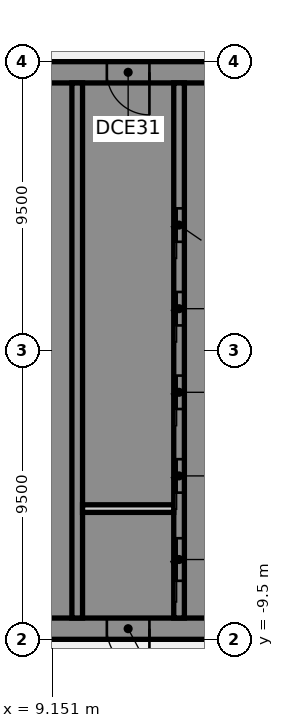
"""IFC4 building model, lengths in metres.
Left out: names, types, materials, properties, quantities, classifications, styles, units other than length and angle.
Written with IfcOpenShell. Run it as: python <this file> out.ifc"""

import sys

from ifc_helpers import new_model, si_unit, direction, frame, frame_2d, origin, place, context, subcontext, project, spatial, polyline, rectangle, outline, extrude, element, fill, save


model = new_model("IFC4")
c1 = context("Model", 3, precision=1e-05, world=origin(), true_north=direction((0.0, 1.0)))
c2 = subcontext(c1, "Body", "Model", "MODEL_VIEW")
j1 = project(units=[si_unit("LENGTHUNIT", "METRE"), si_unit("PLANEANGLEUNIT", "RADIAN")], contexts=[c1])
p1 = place(None, origin())
s1 = spatial("IfcSite", under=j1, at=p1, CompositionType="ELEMENT")
p2 = place(p1, origin())
s2 = spatial("IfcBuilding", under=s1, at=p2, CompositionType="ELEMENT")
p3 = place(p2, frame((0.0, 0.0, 79.0)))
s3 = spatial("IfcBuildingStorey", under=s2, at=p3, CompositionType="ELEMENT", Elevation=79.0)
p4 = place(p3, frame((16.5, -9.15, 0.0), z_axis=(0.0, 0.0, 1.0), x_axis=(-1.0, 0.0, 0.0)))
e1 = element("IfcWall", 1, at=p4, inside=s3, PredefinedType="SHEAR", context=c2, shape_type="SweptSolid", body=[
    extrude(rectangle(XDim=13.0, YDim=0.7, at=frame_2d((6.5, 0.0))), origin(), (0.0, 0.0, 1.0), 4.36),
])
p5 = place(p4, frame((4.15, 0.0, 0.0)))
e2 = element("IfcOpeningElement", 2, at=p5, cuts=e1, PredefinedType="OPENING", context=c2, shape_type="SweptSolid", body=[
    extrude(rectangle(XDim=1.4, YDim=2.1, at=frame_2d((0.7, 1.05))), frame((0.0, 0.36, 0.0), z_axis=(0.0, -1.0, 0.0), x_axis=(1.0, 0.0, 0.0)), (0.0, 0.0, 1.0), 0.72),
])
p6 = place(p4, frame((10.125, 0.0, 0.0)))
e3 = element("IfcOpeningElement", 3, at=p6, cuts=e1, PredefinedType="OPENING", context=c2, shape_type="SweptSolid", body=[
    extrude(rectangle(XDim=1.4, YDim=2.1, at=frame_2d((0.7, 1.05))), frame((0.0, 0.36, 0.0), z_axis=(0.0, -1.0, 0.0), x_axis=(1.0, 0.0, 0.0)), (0.0, 0.0, 1.0), 0.72),
])
p7 = place(p3, origin())
e4 = element("IfcWall", 4, at=p7, inside=s3, PredefinedType="SHEAR", context=c2, shape_type="SweptSolid", body=[
    extrude(outline(polyline([(13.5, -8.8), (15.8, -8.8), (16.5, -8.8), (16.5, 8.8), (15.8, 8.8), (13.5, 8.8), (13.5, 8.125), (15.8, 8.125), (15.8, 5.625), (13.5, 5.625), (13.5, 5.375), (15.8, 5.375), (15.8, 2.875), (13.5, 2.875), (13.5, 2.625), (15.8, 2.625), (15.8, 0.125), (13.5, 0.125), (13.5, -0.125), (15.8, -0.125), (15.8, -2.625), (13.5, -2.625), (13.5, -2.875), (15.8, -2.875), (15.8, -5.375), (13.5, -5.375), (13.5, -5.625), (15.8, -5.625), (15.8, -8.125), (13.5, -8.125), (13.5, -8.8)])), origin(), (0.0, 0.0, 1.0), 4.36),
])
p8 = place(p3, frame((16.5, 9.15, 0.0), z_axis=(0.0, 0.0, 1.0), x_axis=(-1.0, 0.0, 0.0)))
e5 = element("IfcWall", 5, at=p8, inside=s3, PredefinedType="SHEAR", context=c2, shape_type="SweptSolid", body=[
    extrude(rectangle(XDim=13.0, YDim=0.7, at=frame_2d((6.5, 0.0))), origin(), (0.0, 0.0, 1.0), 4.36),
])
p9 = place(p8, frame((4.15, 0.0, 0.0)))
e6 = element("IfcOpeningElement", 6, at=p9, cuts=e5, PredefinedType="OPENING", context=c2, shape_type="SweptSolid", body=[
    extrude(rectangle(XDim=1.4, YDim=2.1, at=frame_2d((0.7, 1.05))), frame((0.0, 0.36, 0.0), z_axis=(0.0, -1.0, 0.0), x_axis=(1.0, 0.0, 0.0)), (0.0, 0.0, 1.0), 0.72),
])
p10 = place(p3, origin())
e7 = element("IfcWall", 7, at=p10, inside=s3, PredefinedType="SHEAR", context=c2, shape_type="SweptSolid", body=[
    extrude(outline(polyline([(9.8, -5.375), (7.5, -5.375), (7.5, -2.875), (9.8, -2.875), (9.8, -2.625), (7.5, -2.625), (7.5, -0.125), (9.8, -0.125), (9.8, 0.125), (7.5, 0.125), (7.5, 2.625), (9.8, 2.625), (9.8, 2.875), (7.5, 2.875), (7.5, 5.375), (9.8, 5.375), (9.8, 5.625), (7.5, 5.625), (7.5, 8.125), (9.8, 8.125), (9.8, 8.8), (7.5, 8.8), (7.15, 8.8), (7.15, -5.625), (7.5, -5.625), (9.8, -5.625), (9.8, -5.375)])), origin(), (0.0, 0.0, 1.0), 4.36),
])
p11 = place(p3, origin())
e8 = element("IfcWall", 8, at=p11, inside=s3, PredefinedType="SHEAR", context=c2, shape_type="SweptSolid", body=[
    extrude(outline(polyline([(7.5, -8.125), (7.5, -8.8), (9.8, -8.8), (9.8, -8.125), (9.8, -5.625), (9.55, -5.625), (9.55, -8.125), (7.5, -8.125)])), origin(), (0.0, 0.0, 1.0), 4.36),
])
p12 = place(p3, frame((13.325, -8.8, 0.0), z_axis=(0.0, 0.0, 1.0), x_axis=(0.0, 1.0, 0.0)))
e9 = element("IfcWall", 9, at=p12, inside=s3, PredefinedType="SHEAR", context=c2, shape_type="SweptSolid", body=[
    extrude(rectangle(XDim=17.6, YDim=0.35, at=frame_2d((8.8, 0.0))), origin(), (0.0, 0.0, 1.0), 4.36),
])
p13 = place(p12, frame((1.225, 0.0, 0.0)))
e10 = element("IfcOpeningElement", 10, at=p13, cuts=e9, PredefinedType="OPENING", context=c2, shape_type="SweptSolid", body=[
    extrude(rectangle(XDim=1.4, YDim=2.1, at=frame_2d((0.7, 1.05))), frame((0.0, 0.185, 0.0), z_axis=(0.0, -1.0, 0.0), x_axis=(1.0, 0.0, 0.0)), (0.0, 0.0, 1.0), 0.37),
])
p14 = place(p12, frame((4.125, 0.0, 0.0)))
e11 = element("IfcOpeningElement", 11, at=p14, cuts=e9, PredefinedType="OPENING", context=c2, shape_type="SweptSolid", body=[
    extrude(rectangle(XDim=1.1, YDim=2.1, at=frame_2d((0.55, 1.05))), frame((0.0, 0.185, 0.0), z_axis=(0.0, -1.0, 0.0), x_axis=(1.0, 0.0, 0.0)), (0.0, 0.0, 1.0), 0.37),
])
p15 = place(p12, frame((6.875, 0.0, 0.0)))
e12 = element("IfcOpeningElement", 12, at=p15, cuts=e9, PredefinedType="OPENING", context=c2, shape_type="SweptSolid", body=[
    extrude(rectangle(XDim=1.1, YDim=2.1, at=frame_2d((0.55, 1.05))), frame((0.0, 0.185, 0.0), z_axis=(0.0, -1.0, 0.0), x_axis=(1.0, 0.0, 0.0)), (0.0, 0.0, 1.0), 0.37),
])
p16 = place(p12, frame((9.625, 0.0, 0.0)))
e13 = element("IfcOpeningElement", 13, at=p16, cuts=e9, PredefinedType="OPENING", context=c2, shape_type="SweptSolid", body=[
    extrude(rectangle(XDim=1.1, YDim=2.1, at=frame_2d((0.55, 1.05))), frame((0.0, 0.185, 0.0), z_axis=(0.0, -1.0, 0.0), x_axis=(1.0, 0.0, 0.0)), (0.0, 0.0, 1.0), 0.37),
])
p17 = place(p12, frame((12.375, 0.0, 0.0)))
e14 = element("IfcOpeningElement", 14, at=p17, cuts=e9, PredefinedType="OPENING", context=c2, shape_type="SweptSolid", body=[
    extrude(rectangle(XDim=1.1, YDim=2.1, at=frame_2d((0.55, 1.05))), frame((0.0, 0.185, 0.0), z_axis=(0.0, -1.0, 0.0), x_axis=(1.0, 0.0, 0.0)), (0.0, 0.0, 1.0), 0.37),
])
p18 = place(p3, frame((9.975, -8.8, 0.0), z_axis=(0.0, 0.0, 1.0), x_axis=(0.0, 1.0, 0.0)))
e15 = element("IfcWall", 15, at=p18, inside=s3, PredefinedType="SHEAR", context=c2, shape_type="SweptSolid", body=[
    extrude(rectangle(XDim=17.6, YDim=0.35, at=frame_2d((8.8, 0.0))), origin(), (0.0, 0.0, 1.0), 4.36),
])
p19 = place(p3, frame((13.15, -5.2, 0.0), z_axis=(0.0, 0.0, 1.0), x_axis=(-1.0, 0.0, 0.0)))
e16 = element("IfcWall", 16, at=p19, inside=s3, PredefinedType="PARTITIONING", context=c2, shape_type="SweptSolid", body=[
    extrude(rectangle(XDim=3.0, YDim=0.25, at=frame_2d((1.5, 0.0))), origin(), (0.0, 0.0, 1.0), 4.36),
])
p20 = place(p5, origin())
e17 = element("IfcDoor", 17, at=p20, inside=s3, OperationType="SINGLE_SWING_LEFT", PredefinedType="DOOR", context=c2, shape_type="SweptSolid", body=[
    extrude(rectangle(XDim=1.4, YDim=2.1, at=frame_2d((0.7, 1.05))), frame((0.0, 0.025, 0.0), z_axis=(0.0, -1.0, 0.0), x_axis=(1.0, 0.0, 0.0)), (0.0, 0.0, 1.0), 0.05),
])
fill(e2, e17)
p21 = place(p13, origin())
e18 = element("IfcDoor", 18, at=p21, inside=s3, OperationType="SLIDING_TO_LEFT", PredefinedType="DOOR", context=c2, shape_type="SweptSolid", body=[
    extrude(rectangle(XDim=1.4, YDim=2.1, at=frame_2d((0.7, 1.05))), frame((0.0, 0.025, 0.0), z_axis=(0.0, -1.0, 0.0), x_axis=(1.0, 0.0, 0.0)), (0.0, 0.0, 1.0), 0.05),
])
fill(e10, e18)
p22 = place(p14, origin())
e19 = element("IfcDoor", 19, at=p22, inside=s3, OperationType="SLIDING_TO_LEFT", PredefinedType="DOOR", context=c2, shape_type="SweptSolid", body=[
    extrude(rectangle(XDim=1.1, YDim=2.1, at=frame_2d((0.55, 1.05))), frame((0.0, 0.025, 0.0), z_axis=(0.0, -1.0, 0.0), x_axis=(1.0, 0.0, 0.0)), (0.0, 0.0, 1.0), 0.05),
])
fill(e11, e19)
p23 = place(p15, origin())
e20 = element("IfcDoor", 20, at=p23, inside=s3, OperationType="SLIDING_TO_LEFT", PredefinedType="DOOR", context=c2, shape_type="SweptSolid", body=[
    extrude(rectangle(XDim=1.1, YDim=2.1, at=frame_2d((0.55, 1.05))), frame((0.0, 0.025, 0.0), z_axis=(0.0, -1.0, 0.0), x_axis=(1.0, 0.0, 0.0)), (0.0, 0.0, 1.0), 0.05),
])
fill(e12, e20)
p24 = place(p16, origin())
e21 = element("IfcDoor", 21, at=p24, inside=s3, OperationType="SLIDING_TO_LEFT", PredefinedType="DOOR", context=c2, shape_type="SweptSolid", body=[
    extrude(rectangle(XDim=1.1, YDim=2.1, at=frame_2d((0.55, 1.05))), frame((0.0, 0.025, 0.0), z_axis=(0.0, -1.0, 0.0), x_axis=(1.0, 0.0, 0.0)), (0.0, 0.0, 1.0), 0.05),
])
fill(e13, e21)
p25 = place(p17, origin())
e22 = element("IfcDoor", 22, at=p25, inside=s3, OperationType="SLIDING_TO_LEFT", PredefinedType="DOOR", context=c2, shape_type="SweptSolid", body=[
    extrude(rectangle(XDim=1.1, YDim=2.1, at=frame_2d((0.55, 1.05))), frame((0.0, 0.025, 0.0), z_axis=(0.0, -1.0, 0.0), x_axis=(1.0, 0.0, 0.0)), (0.0, 0.0, 1.0), 0.05),
])
fill(e14, e22)
p26 = place(p9, origin())
e23 = element("IfcDoor", 23, at=p26, inside=s3, OperationType="SINGLE_SWING_LEFT", PredefinedType="DOOR", context=c2, shape_type="SweptSolid", body=[
    extrude(rectangle(XDim=1.4, YDim=2.1, at=frame_2d((0.7, 1.05))), frame((0.0, 0.025, 0.0), z_axis=(0.0, -1.0, 0.0), x_axis=(1.0, 0.0, 0.0)), (0.0, 0.0, 1.0), 0.05),
])
fill(e6, e23)
save(model, sys.argv[1])
